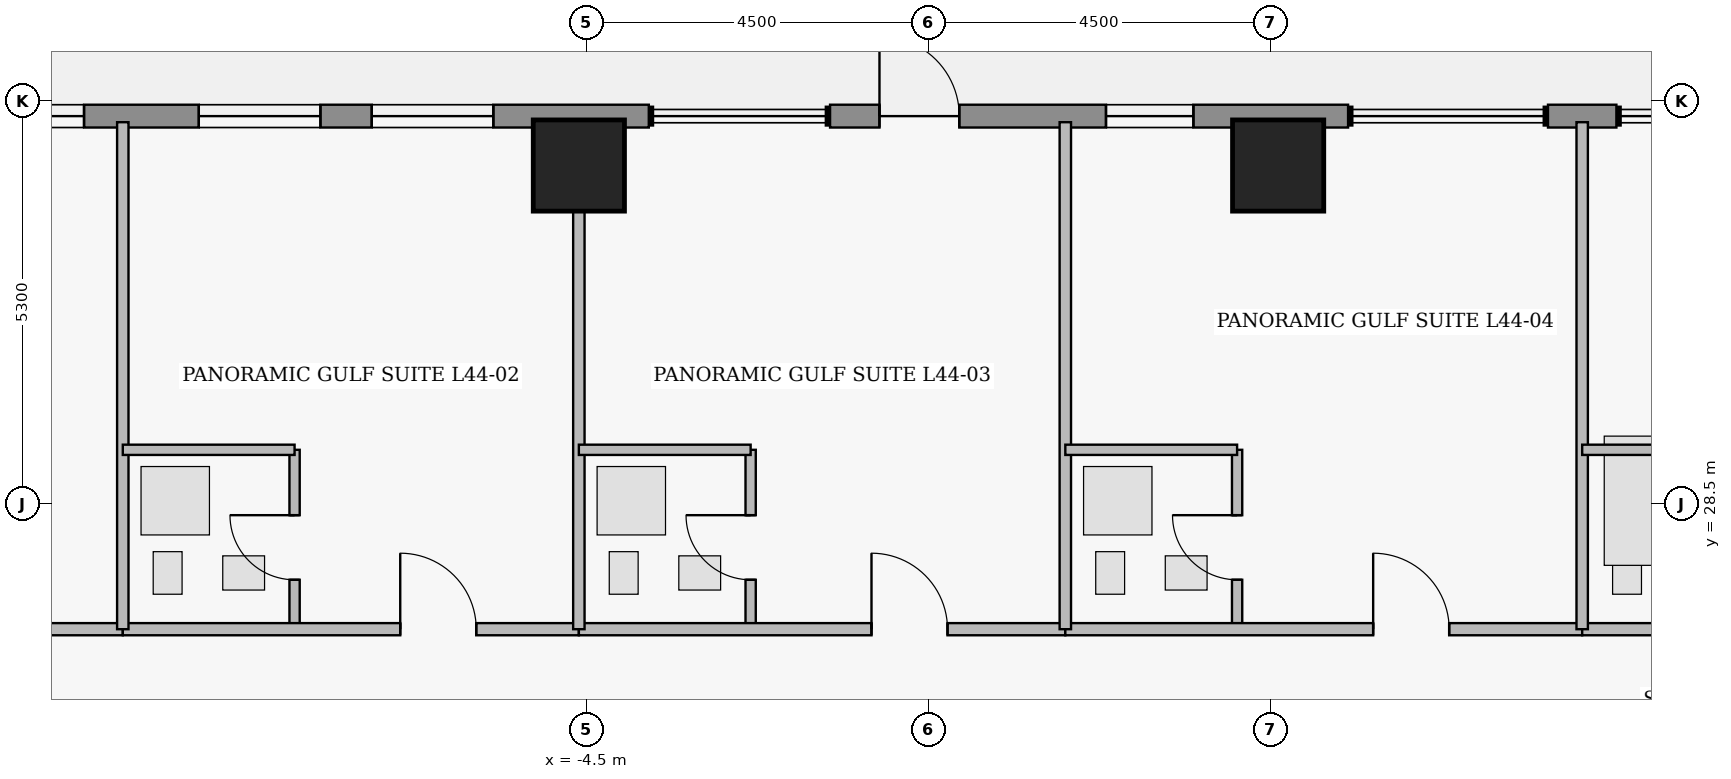
"""IFC4 building model, lengths in metres.
Left out: names, types, materials, properties, quantities, classifications, styles, units other than length and angle.
Written with IfcOpenShell. Run it as: python <this file> out.ifc"""

import sys

from ifc_helpers import new_model, si_unit, direction, frame, frame_2d, origin, origin_2d, place, context, subcontext, project, spatial, rectangle, extrude, element, fill, save


model = new_model("IFC4")
c1 = context("Model", 3, precision=1e-05, world=origin(), true_north=direction((0.0, 1.0)))
c2 = subcontext(c1, "Body", "Model", "MODEL_VIEW")
j1 = project(units=[si_unit("LENGTHUNIT", "METRE"), si_unit("PLANEANGLEUNIT", "RADIAN")], contexts=[c1])
p1 = place(None, origin())
s1 = spatial("IfcSite", under=j1, at=p1, CompositionType="ELEMENT")
p2 = place(p1, origin())
s2 = spatial("IfcBuilding", under=s1, at=p2, CompositionType="ELEMENT")
p3 = place(p2, frame((0.0, 0.0, 177.4)))
s3 = spatial("IfcBuildingStorey", under=s2, at=p3, CompositionType="ELEMENT", Elevation=177.4)
for number, where, z_axis, x_axis in (
    (1, (-4.6, 32.95, 0.0), (0.0, 0.0, 1.0), (1.0, 0.0, 0.0)),
    (2, (4.6, 32.95, 0.0), (0.0, 0.0, 1.0), (1.0, 0.0, 0.0)),
):
    element("IfcColumn", number, at=place(p3, frame(where, z_axis=z_axis, x_axis=x_axis)), inside=s3, PredefinedType="COLUMN", context=c2, shape_type="SweptSolid", body=[
        extrude(rectangle(XDim=1.2, YDim=1.2, at=origin_2d()), origin(), (0.0, 0.0, 1.0), 3.75),
    ])
p4 = place(p3, frame((-14.72, 33.6, 0.0), z_axis=(0.0, 0.0, 1.0), x_axis=(1.0, 0.0, 0.0)))
e3 = element("IfcWall", 3, at=p4, inside=s3, PredefinedType="STANDARD", context=c2, shape_type="SweptSolid", body=[
    extrude(rectangle(XDim=11.04, YDim=0.3, at=frame_2d((5.52, 0.0))), origin(), (0.0, 0.0, 1.0), 3.53),
])
p5 = place(p4, frame((5.12, 0.0, 0.85)))
e4 = element("IfcOpeningElement", 4, at=p5, cuts=e3, PredefinedType="OPENING", context=c2, shape_type="SweptSolid", body=[
    extrude(rectangle(XDim=1.6, YDim=1.8, at=frame_2d((0.8, 0.9))), frame((0.0, 0.16, 0.0), z_axis=(0.0, -1.0, 0.0), x_axis=(1.0, 0.0, 0.0)), (0.0, 0.0, 1.0), 0.32),
])
p6 = place(p4, frame((2.01, 0.0, 0.85)))
e5 = element("IfcOpeningElement", 5, at=p6, cuts=e3, PredefinedType="OPENING", context=c2, shape_type="SweptSolid", body=[
    extrude(rectangle(XDim=1.6, YDim=1.8, at=frame_2d((0.8, 0.9))), frame((0.0, 0.16, 0.0), z_axis=(0.0, -1.0, 0.0), x_axis=(1.0, 0.0, 0.0)), (0.0, 0.0, 1.0), 0.32),
])
p7 = place(p4, frame((7.395, 0.0, 0.85)))
e6 = element("IfcOpeningElement", 6, at=p7, cuts=e3, PredefinedType="OPENING", context=c2, shape_type="SweptSolid", body=[
    extrude(rectangle(XDim=1.6, YDim=1.8, at=frame_2d((0.8, 0.9))), frame((0.0, 0.16, 0.0), z_axis=(0.0, -1.0, 0.0), x_axis=(1.0, 0.0, 0.0)), (0.0, 0.0, 1.0), 0.32),
])
p8 = place(p3, frame((-1.295, 33.6, 0.0), z_axis=(0.0, 0.0, 1.0), x_axis=(1.0, 0.0, 0.0)))
e7 = element("IfcWall", 7, at=p8, inside=s3, PredefinedType="STANDARD", context=c2, shape_type="SweptSolid", body=[
    extrude(rectangle(XDim=6.815, YDim=0.3, at=frame_2d((3.407, 0.0))), origin(), (0.0, 0.0, 1.0), 3.53),
])
p9 = place(p8, frame((0.65, 0.0, 0.0)))
e8 = element("IfcOpeningElement", 8, at=p9, cuts=e7, PredefinedType="OPENING", context=c2, shape_type="SweptSolid", body=[
    extrude(rectangle(XDim=1.05, YDim=2.2, at=frame_2d((0.525, 1.1))), frame((0.0, 0.16, 0.0), z_axis=(0.0, -1.0, 0.0), x_axis=(1.0, 0.0, 0.0)), (0.0, 0.0, 1.0), 0.32),
])
p10 = place(p8, frame((3.63, 0.0, 0.95)))
e9 = element("IfcOpeningElement", 9, at=p10, cuts=e7, PredefinedType="OPENING", context=c2, shape_type="SweptSolid", body=[
    extrude(rectangle(XDim=1.15, YDim=1.55, at=frame_2d((0.575, 0.775))), frame((0.0, 0.16, 0.0), z_axis=(0.0, -1.0, 0.0), x_axis=(1.0, 0.0, 0.0)), (0.0, 0.0, 1.0), 0.32),
])
p11 = place(p3, frame((8.15, 33.6, 0.0), z_axis=(0.0, 0.0, 1.0), x_axis=(1.0, 0.0, 0.0)))
e10 = element("IfcWall", 10, at=p11, inside=s3, PredefinedType="STANDARD", context=c2, shape_type="SweptSolid", body=[
    extrude(rectangle(XDim=0.9, YDim=0.3, at=frame_2d((0.45, 0.0))), origin(), (0.0, 0.0, 1.0), 3.53),
])
p12 = place(p3, frame((-22.04, 26.85, 0.0), z_axis=(0.0, 0.0, 1.0), x_axis=(1.0, 0.0, 0.0)))
e11 = element("IfcWall", 11, at=p12, inside=s3, PredefinedType="PARTITIONING", context=c2, shape_type="SweptSolid", body=[
    extrude(rectangle(XDim=11.44, YDim=0.16, at=frame_2d((5.72, 0.0))), origin(), (0.0, 0.0, 1.0), 3.53),
])
p13 = place(p12, frame((6.37, 0.0, 0.0)))
e12 = element("IfcOpeningElement", 12, at=p13, cuts=e11, PredefinedType="OPENING", context=c2, shape_type="SweptSolid", body=[
    extrude(rectangle(XDim=1.0, YDim=2.15, at=frame_2d((0.5, 1.075))), frame((0.0, 0.09, 0.0), z_axis=(0.0, -1.0, 0.0), x_axis=(1.0, 0.0, 0.0)), (0.0, 0.0, 1.0), 0.18),
])
p14 = place(p3, frame((-8.34, 26.85, 0.0), z_axis=(0.0, 0.0, 1.0), x_axis=(0.0, 1.0, 0.0)))
e13 = element("IfcWall", 13, at=p14, inside=s3, PredefinedType="PLUMBINGWALL", context=c2, shape_type="SweptSolid", body=[
    extrude(rectangle(XDim=2.36, YDim=0.135, at=frame_2d((1.18, 0.0))), origin(), (0.0, 0.0, 1.0), 3.53),
])
p15 = place(p14, frame((0.65, 0.0, 0.0)))
e14 = element("IfcOpeningElement", 14, at=p15, cuts=e13, PredefinedType="OPENING", context=c2, shape_type="SweptSolid", body=[
    extrude(rectangle(XDim=0.85, YDim=2.1, at=frame_2d((0.425, 1.05))), frame((0.0, 0.077, 0.0), z_axis=(0.0, -1.0, 0.0), x_axis=(1.0, 0.0, 0.0)), (0.0, 0.0, 1.0), 0.155),
])
p16 = place(p3, frame((-10.6, 26.85, 0.0), z_axis=(0.0, 0.0, 1.0), x_axis=(1.0, 0.0, 0.0)))
e15 = element("IfcWall", 15, at=p16, inside=s3, PredefinedType="PARTITIONING", context=c2, shape_type="SweptSolid", body=[
    extrude(rectangle(XDim=6.0, YDim=0.16, at=frame_2d((3.0, 0.0))), origin(), (0.0, 0.0, 1.0), 3.53),
])
p17 = place(p16, frame((3.65, 0.0, 0.0)))
e16 = element("IfcOpeningElement", 16, at=p17, cuts=e15, PredefinedType="OPENING", context=c2, shape_type="SweptSolid", body=[
    extrude(rectangle(XDim=1.0, YDim=2.15, at=frame_2d((0.5, 1.075))), frame((0.0, 0.09, 0.0), z_axis=(0.0, -1.0, 0.0), x_axis=(1.0, 0.0, 0.0)), (0.0, 0.0, 1.0), 0.18),
])
p18 = place(p3, frame((-2.34, 26.85, 0.0), z_axis=(0.0, 0.0, 1.0), x_axis=(0.0, 1.0, 0.0)))
e17 = element("IfcWall", 17, at=p18, inside=s3, PredefinedType="PLUMBINGWALL", context=c2, shape_type="SweptSolid", body=[
    extrude(rectangle(XDim=2.36, YDim=0.135, at=frame_2d((1.18, 0.0))), origin(), (0.0, 0.0, 1.0), 3.53),
])
p19 = place(p18, frame((0.65, 0.0, 0.0)))
e18 = element("IfcOpeningElement", 18, at=p19, cuts=e17, PredefinedType="OPENING", context=c2, shape_type="SweptSolid", body=[
    extrude(rectangle(XDim=0.85, YDim=2.1, at=frame_2d((0.425, 1.05))), frame((0.0, 0.077, 0.0), z_axis=(0.0, -1.0, 0.0), x_axis=(1.0, 0.0, 0.0)), (0.0, 0.0, 1.0), 0.155),
])
p20 = place(p3, frame((-4.6, 26.85, 0.0), z_axis=(0.0, 0.0, 1.0), x_axis=(1.0, 0.0, 0.0)))
e19 = element("IfcWall", 19, at=p20, inside=s3, PredefinedType="PARTITIONING", context=c2, shape_type="SweptSolid", body=[
    extrude(rectangle(XDim=6.4, YDim=0.16, at=frame_2d((3.2, 0.0))), origin(), (0.0, 0.0, 1.0), 3.53),
])
p21 = place(p20, frame((3.85, 0.0, 0.0)))
e20 = element("IfcOpeningElement", 20, at=p21, cuts=e19, PredefinedType="OPENING", context=c2, shape_type="SweptSolid", body=[
    extrude(rectangle(XDim=1.0, YDim=2.15, at=frame_2d((0.5, 1.075))), frame((0.0, 0.09, 0.0), z_axis=(0.0, -1.0, 0.0), x_axis=(1.0, 0.0, 0.0)), (0.0, 0.0, 1.0), 0.18),
])
p22 = place(p3, frame((4.06, 26.85, 0.0), z_axis=(0.0, 0.0, 1.0), x_axis=(0.0, 1.0, 0.0)))
e21 = element("IfcWall", 21, at=p22, inside=s3, PredefinedType="PLUMBINGWALL", context=c2, shape_type="SweptSolid", body=[
    extrude(rectangle(XDim=2.36, YDim=0.135, at=frame_2d((1.18, 0.0))), origin(), (0.0, 0.0, 1.0), 3.53),
])
p23 = place(p22, frame((0.65, 0.0, 0.0)))
e22 = element("IfcOpeningElement", 22, at=p23, cuts=e21, PredefinedType="OPENING", context=c2, shape_type="SweptSolid", body=[
    extrude(rectangle(XDim=0.85, YDim=2.1, at=frame_2d((0.425, 1.05))), frame((0.0, 0.077, 0.0), z_axis=(0.0, -1.0, 0.0), x_axis=(1.0, 0.0, 0.0)), (0.0, 0.0, 1.0), 0.155),
])
p24 = place(p3, frame((1.8, 26.85, 0.0), z_axis=(0.0, 0.0, 1.0), x_axis=(1.0, 0.0, 0.0)))
e23 = element("IfcWall", 23, at=p24, inside=s3, PredefinedType="PARTITIONING", context=c2, shape_type="SweptSolid", body=[
    extrude(rectangle(XDim=6.8, YDim=0.16, at=frame_2d((3.4, 0.0))), origin(), (0.0, 0.0, 1.0), 3.53),
])
p25 = place(p24, frame((4.05, 0.0, 0.0)))
e24 = element("IfcOpeningElement", 24, at=p25, cuts=e23, PredefinedType="OPENING", context=c2, shape_type="SweptSolid", body=[
    extrude(rectangle(XDim=1.0, YDim=2.15, at=frame_2d((0.5, 1.075))), frame((0.0, 0.09, 0.0), z_axis=(0.0, -1.0, 0.0), x_axis=(1.0, 0.0, 0.0)), (0.0, 0.0, 1.0), 0.18),
])
p26 = place(p3, frame((8.6, 26.85, 0.0), z_axis=(0.0, 0.0, 1.0), x_axis=(1.0, 0.0, 0.0)))
e25 = element("IfcWall", 25, at=p26, inside=s3, PredefinedType="PARTITIONING", context=c2, shape_type="SweptSolid", body=[
    extrude(rectangle(XDim=13.44, YDim=0.16, at=frame_2d((6.72, 0.0))), origin(), (0.0, 0.0, 1.0), 3.53),
])
p27 = place(p26, frame((7.37, 0.0, 0.0)))
e26 = element("IfcOpeningElement", 26, at=p27, cuts=e25, PredefinedType="OPENING", context=c2, shape_type="SweptSolid", body=[
    extrude(rectangle(XDim=1.0, YDim=2.15, at=frame_2d((0.5, 1.075))), frame((0.0, 0.09, 0.0), z_axis=(0.0, -1.0, 0.0), x_axis=(1.0, 0.0, 0.0)), (0.0, 0.0, 1.0), 0.18),
])
p28 = place(p3, frame((-10.6, 26.85, 0.0), z_axis=(0.0, 0.0, 1.0), x_axis=(0.0, 1.0, 0.0)))
e27 = element("IfcWall", 27, at=p28, inside=s3, PredefinedType="PARTITIONING", context=c2, shape_type="SweptSolid", body=[
    extrude(rectangle(XDim=6.67, YDim=0.15, at=frame_2d((3.335, 0.0))), origin(), (0.0, 0.0, 1.0), 3.53),
])
p29 = place(p3, frame((-10.6, 29.21, 0.0), z_axis=(0.0, 0.0, 1.0), x_axis=(1.0, 0.0, 0.0)))
e28 = element("IfcWall", 28, at=p29, inside=s3, PredefinedType="PLUMBINGWALL", context=c2, shape_type="SweptSolid", body=[
    extrude(rectangle(XDim=2.26, YDim=0.135, at=frame_2d((1.13, 0.0))), origin(), (0.0, 0.0, 1.0), 3.53),
])
p30 = place(p3, frame((-4.6, 26.85, 0.0), z_axis=(0.0, 0.0, 1.0), x_axis=(0.0, 1.0, 0.0)))
e29 = element("IfcWall", 29, at=p30, inside=s3, PredefinedType="PARTITIONING", context=c2, shape_type="SweptSolid", body=[
    extrude(rectangle(XDim=6.67, YDim=0.15, at=frame_2d((3.335, 0.0))), origin(), (0.0, 0.0, 1.0), 2.519),
])
p31 = place(p3, frame((-4.6, 29.21, 0.0), z_axis=(0.0, 0.0, 1.0), x_axis=(1.0, 0.0, 0.0)))
e30 = element("IfcWall", 30, at=p31, inside=s3, PredefinedType="PLUMBINGWALL", context=c2, shape_type="SweptSolid", body=[
    extrude(rectangle(XDim=2.26, YDim=0.135, at=frame_2d((1.13, 0.0))), origin(), (0.0, 0.0, 1.0), 3.53),
])
p32 = place(p3, frame((1.8, 26.85, 0.0), z_axis=(0.0, 0.0, 1.0), x_axis=(0.0, 1.0, 0.0)))
e31 = element("IfcWall", 31, at=p32, inside=s3, PredefinedType="PARTITIONING", context=c2, shape_type="SweptSolid", body=[
    extrude(rectangle(XDim=6.67, YDim=0.15, at=frame_2d((3.335, 0.0))), origin(), (0.0, 0.0, 1.0), 3.53),
])
p33 = place(p3, frame((1.8, 29.21, 0.0), z_axis=(0.0, 0.0, 1.0), x_axis=(1.0, 0.0, 0.0)))
e32 = element("IfcWall", 32, at=p33, inside=s3, PredefinedType="PLUMBINGWALL", context=c2, shape_type="SweptSolid", body=[
    extrude(rectangle(XDim=2.26, YDim=0.135, at=frame_2d((1.13, 0.0))), origin(), (0.0, 0.0, 1.0), 3.53),
])
p34 = place(p3, frame((8.6, 26.85, 0.0), z_axis=(0.0, 0.0, 1.0), x_axis=(0.0, 1.0, 0.0)))
e33 = element("IfcWall", 33, at=p34, inside=s3, PredefinedType="PARTITIONING", context=c2, shape_type="SweptSolid", body=[
    extrude(rectangle(XDim=6.67, YDim=0.15, at=frame_2d((3.335, 0.0))), origin(), (0.0, 0.0, 1.0), 3.53),
])
p35 = place(p3, frame((8.6, 29.21, 0.0), z_axis=(0.0, 0.0, 1.0), x_axis=(1.0, 0.0, 0.0)))
e34 = element("IfcWall", 34, at=p35, inside=s3, PredefinedType="PLUMBINGWALL", context=c2, shape_type="SweptSolid", body=[
    extrude(rectangle(XDim=2.26, YDim=0.135, at=frame_2d((1.13, 0.0))), origin(), (0.0, 0.0, 1.0), 3.53),
])
p36 = place(p5, origin())
e35 = element("IfcWindow", 35, at=p36, inside=s3, PartitioningType="SINGLE_PANEL", PredefinedType="WINDOW", context=c2, shape_type="SweptSolid", body=[
    extrude(rectangle(XDim=1.6, YDim=1.8, at=frame_2d((0.8, 0.9))), frame((0.0, 0.03, 0.0), z_axis=(0.0, -1.0, 0.0), x_axis=(1.0, 0.0, 0.0)), (0.0, 0.0, 1.0), 0.06),
])
fill(e4, e35)
p37 = place(p6, origin())
e36 = element("IfcWindow", 36, at=p37, inside=s3, PartitioningType="SINGLE_PANEL", PredefinedType="WINDOW", context=c2, shape_type="SweptSolid", body=[
    extrude(rectangle(XDim=1.6, YDim=1.8, at=frame_2d((0.8, 0.9))), frame((0.0, 0.03, 0.0), z_axis=(0.0, -1.0, 0.0), x_axis=(1.0, 0.0, 0.0)), (0.0, 0.0, 1.0), 0.06),
])
fill(e5, e36)
p38 = place(p7, origin())
e37 = element("IfcWindow", 37, at=p38, inside=s3, PartitioningType="SINGLE_PANEL", PredefinedType="WINDOW", context=c2, shape_type="SweptSolid", body=[
    extrude(rectangle(XDim=1.6, YDim=1.8, at=frame_2d((0.8, 0.9))), frame((0.0, 0.03, 0.0), z_axis=(0.0, -1.0, 0.0), x_axis=(1.0, 0.0, 0.0)), (0.0, 0.0, 1.0), 0.06),
])
fill(e6, e37)
p39 = place(p9, origin())
e38 = element("IfcDoor", 38, at=p39, inside=s3, OperationType="SINGLE_SWING_LEFT", PredefinedType="DOOR", context=c2, shape_type="SweptSolid", body=[
    extrude(rectangle(XDim=1.05, YDim=2.2, at=frame_2d((0.525, 1.1))), frame((0.0, 0.025, 0.0), z_axis=(0.0, -1.0, 0.0), x_axis=(1.0, 0.0, 0.0)), (0.0, 0.0, 1.0), 0.05),
])
fill(e8, e38)
p40 = place(p10, origin())
e39 = element("IfcWindow", 39, at=p40, inside=s3, PartitioningType="SINGLE_PANEL", PredefinedType="WINDOW", context=c2, shape_type="SweptSolid", body=[
    extrude(rectangle(XDim=1.15, YDim=1.55, at=frame_2d((0.575, 0.775))), frame((0.0, 0.03, 0.0), z_axis=(0.0, -1.0, 0.0), x_axis=(1.0, 0.0, 0.0)), (0.0, 0.0, 1.0), 0.06),
])
fill(e9, e39)
p41 = place(p15, origin())
e40 = element("IfcDoor", 40, at=p41, inside=s3, OperationType="SINGLE_SWING_RIGHT", PredefinedType="DOOR", context=c2, shape_type="SweptSolid", body=[
    extrude(rectangle(XDim=0.85, YDim=2.1, at=frame_2d((0.425, 1.05))), frame((0.0, 0.025, 0.0), z_axis=(0.0, -1.0, 0.0), x_axis=(1.0, 0.0, 0.0)), (0.0, 0.0, 1.0), 0.05),
])
fill(e14, e40)
p42 = place(p17, origin())
e41 = element("IfcDoor", 41, at=p42, inside=s3, OperationType="SINGLE_SWING_LEFT", PredefinedType="DOOR", context=c2, shape_type="SweptSolid", body=[
    extrude(rectangle(XDim=1.0, YDim=2.15, at=frame_2d((0.5, 1.075))), frame((0.0, 0.025, 0.0), z_axis=(0.0, -1.0, 0.0), x_axis=(1.0, 0.0, 0.0)), (0.0, 0.0, 1.0), 0.05),
])
fill(e16, e41)
p43 = place(p19, origin())
e42 = element("IfcDoor", 42, at=p43, inside=s3, OperationType="SINGLE_SWING_RIGHT", PredefinedType="DOOR", context=c2, shape_type="SweptSolid", body=[
    extrude(rectangle(XDim=0.85, YDim=2.1, at=frame_2d((0.425, 1.05))), frame((0.0, 0.025, 0.0), z_axis=(0.0, -1.0, 0.0), x_axis=(1.0, 0.0, 0.0)), (0.0, 0.0, 1.0), 0.05),
])
fill(e18, e42)
p44 = place(p21, origin())
e43 = element("IfcDoor", 43, at=p44, inside=s3, OperationType="SINGLE_SWING_LEFT", PredefinedType="DOOR", context=c2, shape_type="SweptSolid", body=[
    extrude(rectangle(XDim=1.0, YDim=2.15, at=frame_2d((0.5, 1.075))), frame((0.0, 0.025, 0.0), z_axis=(0.0, -1.0, 0.0), x_axis=(1.0, 0.0, 0.0)), (0.0, 0.0, 1.0), 0.05),
])
fill(e20, e43)
p45 = place(p23, origin())
e44 = element("IfcDoor", 44, at=p45, inside=s3, OperationType="SINGLE_SWING_RIGHT", PredefinedType="DOOR", context=c2, shape_type="SweptSolid", body=[
    extrude(rectangle(XDim=0.85, YDim=2.1, at=frame_2d((0.425, 1.05))), frame((0.0, 0.025, 0.0), z_axis=(0.0, -1.0, 0.0), x_axis=(1.0, 0.0, 0.0)), (0.0, 0.0, 1.0), 0.05),
])
fill(e22, e44)
p46 = place(p25, origin())
e45 = element("IfcDoor", 45, at=p46, inside=s3, OperationType="SINGLE_SWING_LEFT", PredefinedType="DOOR", context=c2, shape_type="SweptSolid", body=[
    extrude(rectangle(XDim=1.0, YDim=2.15, at=frame_2d((0.5, 1.075))), frame((0.0, 0.025, 0.0), z_axis=(0.0, -1.0, 0.0), x_axis=(1.0, 0.0, 0.0)), (0.0, 0.0, 1.0), 0.05),
])
fill(e24, e45)
save(model, sys.argv[1])
